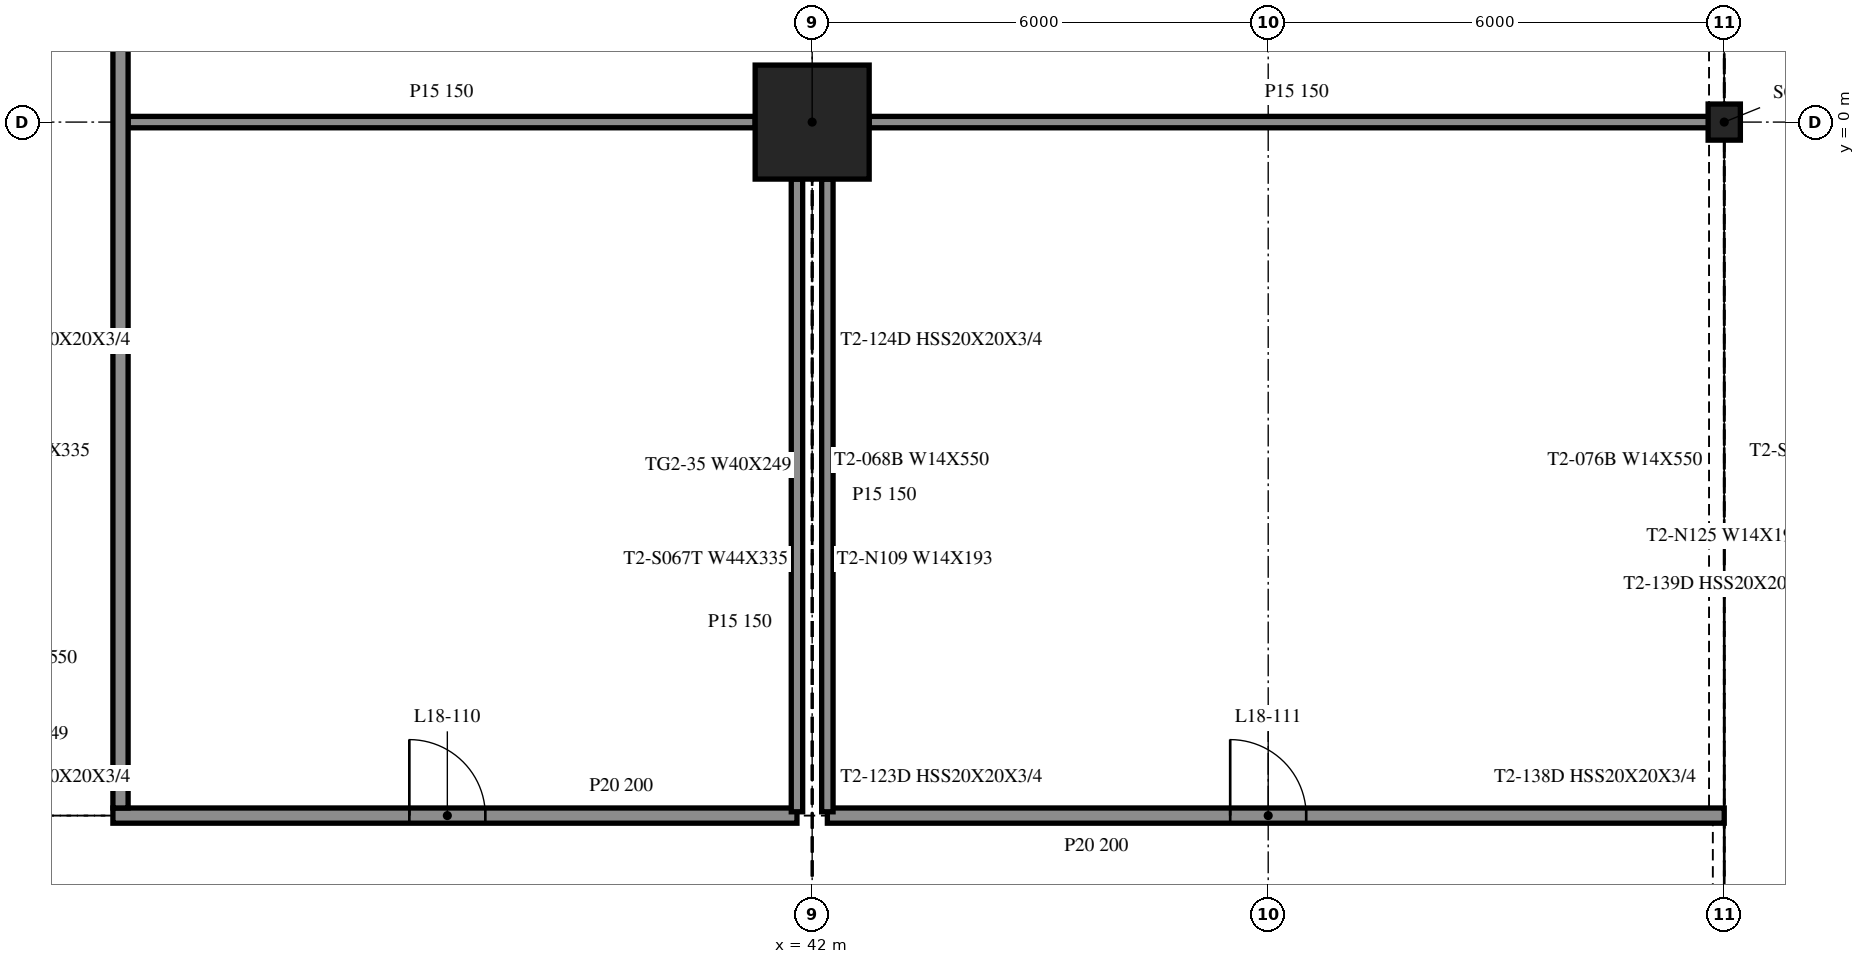
"""IFC4 building model, lengths in metres.
Left out: names, types, materials, properties, quantities, classifications, styles, units other than length and angle.
Written with IfcOpenShell. Run it as: python <this file> out.ifc"""

import sys

from ifc_helpers import new_model, si_unit, direction, frame, frame_2d, origin, origin_2d, place, context, subcontext, project, spatial, rectangle, i_section, extrude, element, fill, save


model = new_model("IFC4")
c1 = context("Model", 3, precision=1e-05, world=origin(), true_north=direction((0.0, 1.0)))
c2 = subcontext(c1, "Body", "Model", "MODEL_VIEW")
j1 = project(units=[si_unit("LENGTHUNIT", "METRE"), si_unit("PLANEANGLEUNIT", "RADIAN")], contexts=[c1])
p1 = place(None, origin())
s1 = spatial("IfcSite", under=j1, at=p1, CompositionType="ELEMENT")
p2 = place(p1, origin())
s2 = spatial("IfcBuilding", under=s1, at=p2, CompositionType="ELEMENT")
p3 = place(p2, frame((0.0, 0.0, 80.4)))
s3 = spatial("IfcBuildingStorey", under=s2, at=p3, CompositionType="ELEMENT", Elevation=80.4)
p4 = place(p3, frame((42.0, 0.0, -0.55), z_axis=(0.0, 0.0, 1.0), x_axis=(1.0, 0.0, 0.0)))
e1 = element("IfcColumn", 1, at=p4, inside=s3, PredefinedType="COLUMN", context=c2, shape_type="SweptSolid", body=[
    extrude(rectangle(XDim=1.5, YDim=1.5, at=origin_2d()), origin(), (0.0, 0.0, 1.0), 4.61),
])
p5 = place(p3, frame((54.0, 0.0, -0.55), z_axis=(0.0, 0.0, 1.0), x_axis=(1.0, 0.0, 0.0)))
e2 = element("IfcColumn", 2, at=p5, inside=s3, PredefinedType="COLUMN", context=c2, shape_type="SweptSolid", body=[
    extrude(i_section(OverallWidth=0.424, OverallDepth=0.475, WebThickness=0.048, FlangeThickness=0.077, at=origin_2d()), origin(), (0.0, 0.0, 1.0), 4.61),
])
p6 = place(p3, frame((32.8, -9.125, 0.0), z_axis=(0.0, 0.0, 1.0), x_axis=(1.0, 0.0, 0.0)))
e3 = element("IfcWall", 3, at=p6, inside=s3, PredefinedType="PARTITIONING", context=c2, shape_type="SweptSolid", body=[
    extrude(rectangle(XDim=9.0, YDim=0.2, at=frame_2d((4.5, 0.0))), origin(), (0.0, 0.0, 1.0), 4.06),
])
p7 = place(p6, frame((3.9, 0.0, 0.0)))
e4 = element("IfcOpeningElement", 4, at=p7, cuts=e3, PredefinedType="OPENING", context=c2, shape_type="SweptSolid", body=[
    extrude(rectangle(XDim=1.0, YDim=2.1, at=frame_2d((0.5, 1.05))), frame((0.0, 0.11, 0.0), z_axis=(0.0, -1.0, 0.0), x_axis=(1.0, 0.0, 0.0)), (0.0, 0.0, 1.0), 0.22),
])
p8 = place(p3, frame((42.2, -9.125, 0.0), z_axis=(0.0, 0.0, 1.0), x_axis=(1.0, 0.0, 0.0)))
e5 = element("IfcWall", 5, at=p8, inside=s3, PredefinedType="PARTITIONING", context=c2, shape_type="SweptSolid", body=[
    extrude(rectangle(XDim=11.8, YDim=0.2, at=frame_2d((5.9, 0.0))), origin(), (0.0, 0.0, 1.0), 4.06),
])
p9 = place(p8, frame((5.3, 0.0, 0.0)))
e6 = element("IfcOpeningElement", 6, at=p9, cuts=e5, PredefinedType="OPENING", context=c2, shape_type="SweptSolid", body=[
    extrude(rectangle(XDim=1.0, YDim=2.1, at=frame_2d((0.5, 1.05))), frame((0.0, 0.11, 0.0), z_axis=(0.0, -1.0, 0.0), x_axis=(1.0, 0.0, 0.0)), (0.0, 0.0, 1.0), 0.22),
])
p10 = place(p3, frame((33.0, 0.0, 0.0), z_axis=(0.0, 0.0, 1.0), x_axis=(1.0, 0.0, 0.0)))
e7 = element("IfcWall", 7, at=p10, inside=s3, PredefinedType="PARTITIONING", context=c2, shape_type="SweptSolid", body=[
    extrude(rectangle(XDim=8.25, YDim=0.15, at=frame_2d((4.125, 0.0))), origin(), (0.0, 0.0, 1.0), 4.06),
])
p11 = place(p3, frame((42.75, 0.0, 0.0), z_axis=(0.0, 0.0, 1.0), x_axis=(1.0, 0.0, 0.0)))
e8 = element("IfcWall", 8, at=p11, inside=s3, PredefinedType="PARTITIONING", context=c2, shape_type="SweptSolid", body=[
    extrude(rectangle(XDim=11.25, YDim=0.15, at=frame_2d((5.625, 0.0))), origin(), (0.0, 0.0, 1.0), 4.06),
])
p12 = place(p3, frame((32.9, -9.025, 0.0), z_axis=(0.0, 0.0, 1.0), x_axis=(0.0, 1.0, 0.0)))
e9 = element("IfcWall", 9, at=p12, inside=s3, PredefinedType="PARTITIONING", context=c2, shape_type="SweptSolid", body=[
    extrude(rectangle(XDim=24.05, YDim=0.2, at=frame_2d((12.025, 0.0))), origin(), (0.0, 0.0, 1.0), 4.06),
])
for number, where, z_axis, x_axis in (
    (10, (41.8, -9.075, 0.0), (0.0, 0.0, 1.0), (0.0, 1.0, 0.0)),
    (11, (42.2, -9.075, 0.0), (0.0, 0.0, 1.0), (0.0, 1.0, 0.0)),
):
    element("IfcWall", number, at=place(p3, frame(where, z_axis=z_axis, x_axis=x_axis)), inside=s3, PredefinedType="PARTITIONING", context=c2, shape_type="SweptSolid", body=[
        extrude(rectangle(XDim=8.325, YDim=0.15, at=frame_2d((4.163, 0.0))), origin(), (0.0, 0.0, 1.0), 4.06),
    ])
p13 = place(p7, origin())
e12 = element("IfcDoor", 12, at=p13, inside=s3, OperationType="SINGLE_SWING_LEFT", PredefinedType="DOOR", context=c2, shape_type="SweptSolid", body=[
    extrude(rectangle(XDim=1.0, YDim=2.1, at=frame_2d((0.5, 1.05))), frame((0.0, 0.025, 0.0), z_axis=(0.0, -1.0, 0.0), x_axis=(1.0, 0.0, 0.0)), (0.0, 0.0, 1.0), 0.05),
])
fill(e4, e12)
p14 = place(p9, origin())
e13 = element("IfcDoor", 13, at=p14, inside=s3, OperationType="SINGLE_SWING_LEFT", PredefinedType="DOOR", context=c2, shape_type="SweptSolid", body=[
    extrude(rectangle(XDim=1.0, YDim=2.1, at=frame_2d((0.5, 1.05))), frame((0.0, 0.025, 0.0), z_axis=(0.0, -1.0, 0.0), x_axis=(1.0, 0.0, 0.0)), (0.0, 0.0, 1.0), 0.05),
])
fill(e6, e13)
save(model, sys.argv[1])
